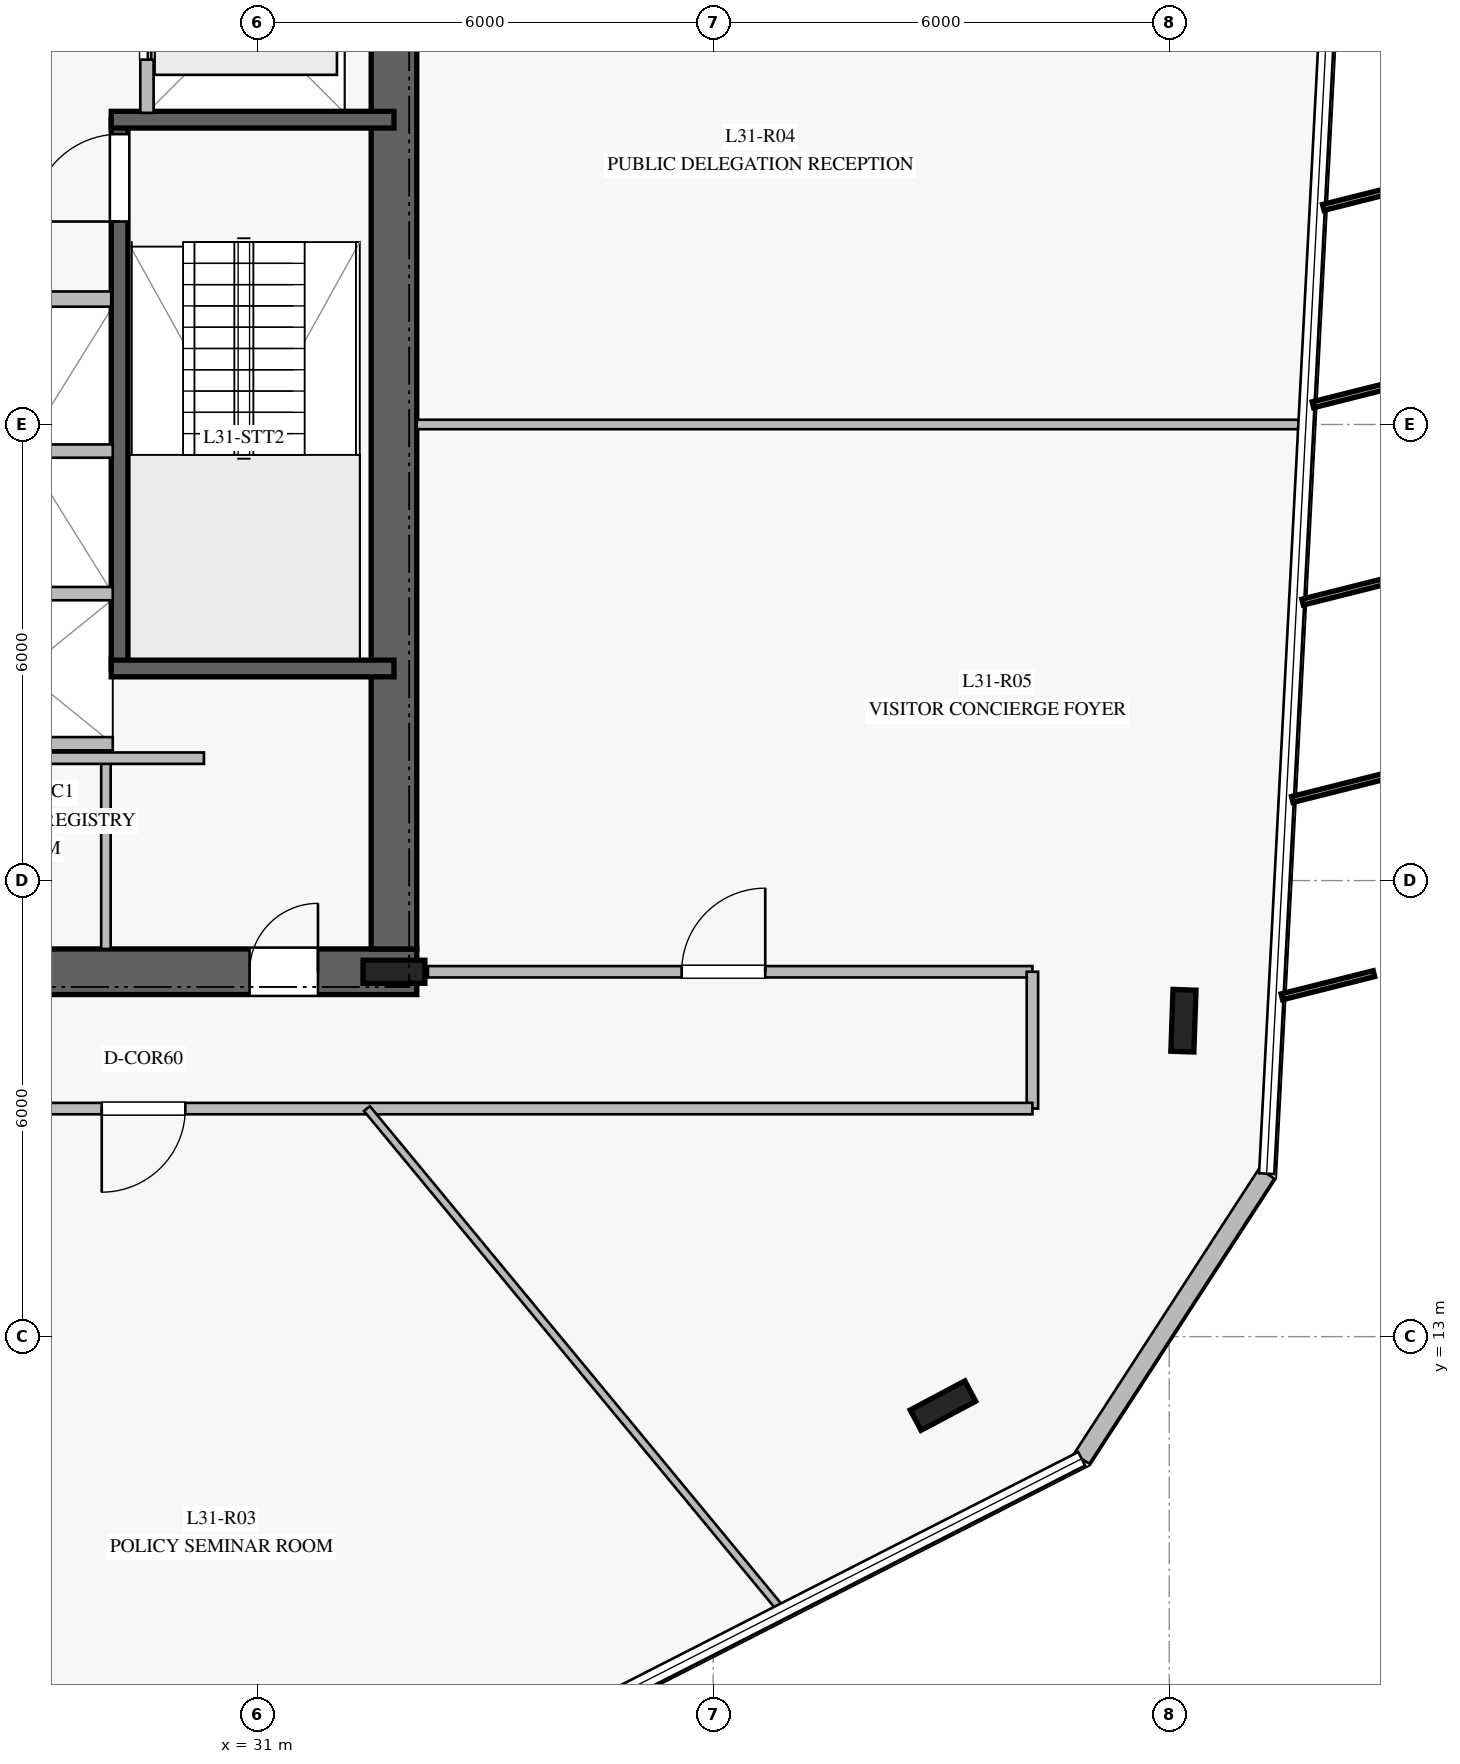
"""IFC4 building model, lengths in metres.
Left out: names, types, materials, properties, quantities, classifications, styles, units other than length and angle.
Written with IfcOpenShell. Run it as: python <this file> out.ifc"""

import sys

from ifc_helpers import new_model, si_unit, direction, frame, frame_2d, origin, origin_2d, place, context, subcontext, project, spatial, rectangle, i_section, extrude, element, fill, save


model = new_model("IFC4")
c1 = context("Model", 3, precision=1e-05, world=origin(), true_north=direction((0.0, 1.0)))
c2 = subcontext(c1, "Body", "Model", "MODEL_VIEW")
j1 = project(units=[si_unit("LENGTHUNIT", "METRE"), si_unit("PLANEANGLEUNIT", "RADIAN")], contexts=[c1])
p1 = place(None, origin())
s1 = spatial("IfcSite", under=j1, at=p1, CompositionType="ELEMENT")
p2 = place(p1, origin())
s2 = spatial("IfcBuilding", under=s1, at=p2, CompositionType="ELEMENT")
p3 = place(p2, frame((0.0, 0.0, 130.4)))
s3 = spatial("IfcBuildingStorey", under=s2, at=p3, CompositionType="ELEMENT", Elevation=130.4)
p4 = place(p3, frame((16.9, 17.8, 0.0), z_axis=(0.0, 0.0, 1.0), x_axis=(1.0, 0.0, 0.0)))
e1 = element("IfcWall", 1, at=p4, inside=s3, PredefinedType="SHEAR", context=c2, shape_type="SweptSolid", body=[
    extrude(rectangle(XDim=16.2, YDim=0.6, at=frame_2d((8.1, 0.0))), origin(), (0.0, 0.0, 1.0), 3.76),
])
p5 = place(p4, frame((5.05, 0.0, 0.0)))
e2 = element("IfcOpeningElement", 2, at=p5, cuts=e1, PredefinedType="OPENING", context=c2, shape_type="SweptSolid", body=[
    extrude(rectangle(XDim=1.2, YDim=2.25, at=frame_2d((0.6, 1.125))), frame((0.0, 0.31, 0.0), z_axis=(0.0, -1.0, 0.0), x_axis=(1.0, 0.0, 0.0)), (0.0, 0.0, 1.0), 0.62),
])
p6 = place(p4, frame((14.0, 0.0, 0.0)))
e3 = element("IfcOpeningElement", 3, at=p6, cuts=e1, PredefinedType="OPENING", context=c2, shape_type="SweptSolid", body=[
    extrude(rectangle(XDim=0.9, YDim=2.1, at=frame_2d((0.45, 1.05))), frame((0.0, 0.31, 0.0), z_axis=(0.0, -1.0, 0.0), x_axis=(1.0, 0.0, 0.0)), (0.0, 0.0, 1.0), 0.62),
])
p7 = place(p4, frame((9.25, 0.0, 0.0)))
e4 = element("IfcOpeningElement", 4, at=p7, cuts=e1, PredefinedType="OPENING", context=c2, shape_type="SweptSolid", body=[
    extrude(rectangle(XDim=1.1, YDim=2.2, at=frame_2d((0.55, 1.1))), frame((0.0, 0.31, 0.0), z_axis=(0.0, -1.0, 0.0), x_axis=(1.0, 0.0, 0.0)), (0.0, 0.0, 1.0), 0.62),
])
p8 = place(p3, frame((32.8, 18.1, 0.0), z_axis=(0.0, 0.0, 1.0), x_axis=(0.0, 1.0, 0.0)))
e5 = element("IfcWall", 5, at=p8, inside=s3, PredefinedType="SHEAR", context=c2, shape_type="SweptSolid", body=[
    extrude(rectangle(XDim=13.8, YDim=0.6, at=frame_2d((6.9, 0.0))), origin(), (0.0, 0.0, 1.0), 3.76),
])
p9 = place(p3, frame((32.8, 17.8, 0.0), z_axis=(0.0, 0.0, 1.0), x_axis=(1.0, 0.0, 0.0)))
e6 = element("IfcColumn", 6, at=p9, inside=s3, PredefinedType="COLUMN", context=c2, shape_type="SweptSolid", body=[
    extrude(i_section(OverallWidth=0.303, OverallDepth=0.814, WebThickness=0.021, FlangeThickness=0.04, at=origin_2d()), origin(), (0.0, 0.0, 1.0), 4.0),
])
p10 = place(p3, frame((29.19, 21.79, 0.0), z_axis=(0.0, 0.0, 1.0), x_axis=(0.0, 1.0, 0.0)))
e7 = element("IfcWall", 7, at=p10, inside=s3, PredefinedType="SOLIDWALL", context=c2, shape_type="SweptSolid", body=[
    extrude(rectangle(XDim=7.22, YDim=0.22, at=frame_2d((3.61, 0.0))), origin(), (0.0, 0.0, 1.0), 3.76),
])
p11 = place(p10, frame((5.88, 0.0, 0.0)))
e8 = element("IfcOpeningElement", 8, at=p11, cuts=e7, PredefinedType="OPENING", context=c2, shape_type="SweptSolid", body=[
    extrude(rectangle(XDim=1.15, YDim=2.2, at=frame_2d((0.575, 1.1))), frame((0.0, 0.12, 0.0), z_axis=(0.0, -1.0, 0.0), x_axis=(1.0, 0.0, 0.0)), (0.0, 0.0, 1.0), 0.24),
])
for number, where, z_axis, x_axis in (
    (9, (29.08, 21.79, 0.0), (0.0, 0.0, 1.0), (1.0, 0.0, 0.0)),
    (10, (29.08, 29.01, 0.0), (0.0, 0.0, 1.0), (1.0, 0.0, 0.0)),
):
    element("IfcWall", number, at=place(p3, frame(where, z_axis=z_axis, x_axis=x_axis)), inside=s3, PredefinedType="SOLIDWALL", context=c2, shape_type="SweptSolid", body=[
        extrude(rectangle(XDim=3.72, YDim=0.22, at=frame_2d((1.86, 0.0))), origin(), (0.0, 0.0, 1.0), 3.76),
    ])
for number, where, z_axis, x_axis in (
    (11, (40.023, 12.092, 0.0), (0.0, 0.0, 1.0), (0.883, 0.469, 0.0)),
    (12, (43.187, 17.156, 0.0), (0.0, 0.0, 1.0), (0.035, 0.999, 0.0)),
):
    element("IfcColumn", number, at=place(p3, frame(where, z_axis=z_axis, x_axis=x_axis)), inside=s3, PredefinedType="COLUMN", context=c2, shape_type="SweptSolid", body=[
        extrude(i_section(OverallWidth=0.303, OverallDepth=0.814, WebThickness=0.021, FlangeThickness=0.04, at=origin_2d()), origin(), (0.0, 0.0, 1.0), 4.0),
    ])
p12 = place(p3, frame((41.848, 11.393, 0.0), z_axis=(0.0, 0.0, 1.0), x_axis=(0.544351046129, 0.838857519832, 0.0)))
e13 = element("IfcWall", 13, at=p12, inside=s3, PredefinedType="STANDARD", context=c2, shape_type="SweptSolid", body=[
    extrude(rectangle(XDim=4.471, YDim=0.24, at=frame_2d((2.236, 0.0))), origin(), (0.0, 0.0, 1.0), 3.76),
])
p13 = place(p3, frame((25.7, 26.65, 0.0), z_axis=(0.0, 0.0, 1.0), x_axis=(1.0, 0.0, 0.0)))
e14 = element("IfcWall", 14, at=p13, inside=s3, PredefinedType="PARTITIONING", context=c2, shape_type="SweptSolid", body=[
    extrude(rectangle(XDim=3.38, YDim=0.2, at=frame_2d((1.69, 0.0))), origin(), (0.0, 0.0, 1.0), 3.76),
])
p14 = place(p3, frame((29.01, 18.1, 0.0), z_axis=(0.0, 0.0, 1.0), x_axis=(0.0, 1.0, 0.0)))
e15 = element("IfcWall", 15, at=p14, inside=s3, PredefinedType="PARTITIONING", context=c2, shape_type="SweptSolid", body=[
    extrude(rectangle(XDim=2.45, YDim=0.125, at=frame_2d((1.225, 0.0))), origin(), (0.0, 0.0, 1.0), 3.76),
])
p15 = place(p3, frame((24.4, 20.61, 0.0), z_axis=(0.0, 0.0, 1.0), x_axis=(1.0, 0.0, 0.0)))
e16 = element("IfcWall", 16, at=p15, inside=s3, PredefinedType="PARTITIONING", context=c2, shape_type="SweptSolid", body=[
    extrude(rectangle(XDim=5.9, YDim=0.15, at=frame_2d((2.95, 0.0))), origin(), (0.0, 0.0, 1.0), 3.76),
])
for number, where, z_axis, x_axis in (
    (17, (26.75, 20.8, 0.0), (0.0, 0.0, 1.0), (1.0, 0.0, 0.0)),
    (18, (26.75, 22.775, 0.0), (0.0, 0.0, 1.0), (1.0, 0.0, 0.0)),
    (19, (26.75, 24.65, 0.0), (0.0, 0.0, 1.0), (1.0, 0.0, 0.0)),
):
    element("IfcWall", number, at=place(p3, frame(where, z_axis=z_axis, x_axis=x_axis)), inside=s3, PredefinedType="PARTITIONING", context=c2, shape_type="SweptSolid", body=[
        extrude(rectangle(XDim=2.35, YDim=0.175, at=frame_2d((1.175, 0.0))), origin(), (0.0, 0.0, 1.0), 3.76),
    ])
p16 = place(p3, frame((29.55, 29.1, 0.0), z_axis=(0.0, 0.0, 1.0), x_axis=(0.0, 1.0, 0.0)))
e20 = element("IfcWall", 20, at=p16, inside=s3, PredefinedType="PARTITIONING", context=c2, shape_type="SweptSolid", body=[
    extrude(rectangle(XDim=2.6, YDim=0.175, at=frame_2d((1.3, 0.0))), origin(), (0.0, 0.0, 1.0), 3.76),
])
p17 = place(p16, frame((0.7, 0.0, 0.0)))
e21 = element("IfcOpeningElement", 21, at=p17, cuts=e20, PredefinedType="OPENING", context=c2, shape_type="SweptSolid", body=[
    extrude(rectangle(XDim=1.2, YDim=2.2, at=frame_2d((0.6, 1.1))), frame((0.0, 0.098, 0.0), z_axis=(0.0, -1.0, 0.0), x_axis=(1.0, 0.0, 0.0)), (0.0, 0.0, 1.0), 0.195),
])
p18 = place(p3, frame((33.247, 17.8, 0.0), z_axis=(0.0, 0.0, 1.0), x_axis=(1.0, 0.0, 0.0)))
e22 = element("IfcWall", 22, at=p18, inside=s3, PredefinedType="PARTITIONING", context=c2, shape_type="SweptSolid", body=[
    extrude(rectangle(XDim=7.953, YDim=0.15, at=frame_2d((3.977, 0.0))), origin(), (0.0, 0.0, 1.0), 3.21),
])
p19 = place(p18, frame((3.338, 0.0, 0.0)))
e23 = element("IfcOpeningElement", 23, at=p19, cuts=e22, PredefinedType="OPENING", context=c2, shape_type="SweptSolid", body=[
    extrude(rectangle(XDim=1.1, YDim=2.2, at=frame_2d((0.55, 1.1))), frame((0.0, 0.085, 0.0), z_axis=(0.0, -1.0, 0.0), x_axis=(1.0, 0.0, 0.0)), (0.0, 0.0, 1.0), 0.17),
])
p20 = place(p3, frame((41.2, 17.8, 0.0), z_axis=(0.0, 0.0, 1.0), x_axis=(0.0, -1.0, 0.0)))
e24 = element("IfcWall", 24, at=p20, inside=s3, PredefinedType="PARTITIONING", context=c2, shape_type="SweptSolid", body=[
    extrude(rectangle(XDim=1.8, YDim=0.15, at=frame_2d((0.9, 0.0))), origin(), (0.0, 0.0, 1.0), 3.21),
])
p21 = place(p3, frame((41.2, 16.0, 0.0), z_axis=(0.0, 0.0, 1.0), x_axis=(-1.0, 0.0, 0.0)))
e25 = element("IfcWall", 25, at=p21, inside=s3, PredefinedType="PARTITIONING", context=c2, shape_type="SweptSolid", body=[
    extrude(rectangle(XDim=15.25, YDim=0.15, at=frame_2d((7.625, 0.0))), origin(), (0.0, 0.0, 1.0), 3.21),
])
p22 = place(p21, frame((11.145, 0.0, 0.0)))
e26 = element("IfcOpeningElement", 26, at=p22, cuts=e25, PredefinedType="OPENING", context=c2, shape_type="SweptSolid", body=[
    extrude(rectangle(XDim=1.1, YDim=2.2, at=frame_2d((0.55, 1.1))), frame((0.0, 0.085, 0.0), z_axis=(0.0, -1.0, 0.0), x_axis=(1.0, 0.0, 0.0)), (0.0, 0.0, 1.0), 0.17),
])
p23 = place(p3, frame((32.444, 16.0, 0.0), z_axis=(0.0, 0.0, 1.0), x_axis=(0.637251985901, -0.770655504402, 0.0)))
e27 = element("IfcWall", 27, at=p23, inside=s3, PredefinedType="MOVABLE", context=c2, shape_type="SweptSolid", body=[
    extrude(rectangle(XDim=8.563, YDim=0.1, at=frame_2d((4.281, 0.0))), origin(), (0.0, 0.0, 1.0), 3.16),
])
p24 = place(p3, frame((33.1, 25.0, 0.0), z_axis=(0.0, 0.0, 1.0), x_axis=(1.0, 0.0, 0.0)))
e28 = element("IfcWall", 28, at=p24, inside=s3, PredefinedType="PARTITIONING", context=c2, shape_type="SweptSolid", body=[
    extrude(rectangle(XDim=11.682, YDim=0.125, at=frame_2d((5.841, 0.0))), origin(), (0.0, 0.0, 1.0), 3.16),
])
p25 = place(p11, origin())
e29 = element("IfcDoor", 29, at=p25, inside=s3, OperationType="SINGLE_SWING_LEFT", PredefinedType="DOOR", context=c2, shape_type="SweptSolid", body=[
    extrude(rectangle(XDim=1.15, YDim=2.2, at=frame_2d((0.575, 1.1))), frame((0.0, 0.025, 0.0), z_axis=(0.0, -1.0, 0.0), x_axis=(1.0, 0.0, 0.0)), (0.0, 0.0, 1.0), 0.05),
])
fill(e8, e29)
p26 = place(p6, origin())
e30 = element("IfcDoor", 30, at=p26, inside=s3, OperationType="SINGLE_SWING_RIGHT", PredefinedType="DOOR", context=c2, shape_type="SweptSolid", body=[
    extrude(rectangle(XDim=0.9, YDim=2.1, at=frame_2d((0.45, 1.05))), frame((0.0, 0.025, 0.0), z_axis=(0.0, -1.0, 0.0), x_axis=(1.0, 0.0, 0.0)), (0.0, 0.0, 1.0), 0.05),
])
fill(e3, e30)
p27 = place(p17, origin())
e31 = element("IfcDoor", 31, at=p27, inside=s3, OperationType="DOUBLE_DOOR_SLIDING", PredefinedType="DOOR", context=c2, shape_type="SweptSolid", body=[
    extrude(rectangle(XDim=1.2, YDim=2.2, at=frame_2d((0.6, 1.1))), frame((0.0, 0.025, 0.0), z_axis=(0.0, -1.0, 0.0), x_axis=(1.0, 0.0, 0.0)), (0.0, 0.0, 1.0), 0.05),
])
fill(e21, e31)
p28 = place(p22, origin())
e32 = element("IfcDoor", 32, at=p28, inside=s3, OperationType="SINGLE_SWING_RIGHT", PredefinedType="DOOR", context=c2, shape_type="SweptSolid", body=[
    extrude(rectangle(XDim=1.1, YDim=2.2, at=frame_2d((0.55, 1.1))), frame((0.0, 0.025, 0.0), z_axis=(0.0, -1.0, 0.0), x_axis=(1.0, 0.0, 0.0)), (0.0, 0.0, 1.0), 0.05),
])
fill(e26, e32)
p29 = place(p19, origin())
e33 = element("IfcDoor", 33, at=p29, inside=s3, OperationType="SINGLE_SWING_RIGHT", PredefinedType="DOOR", context=c2, shape_type="SweptSolid", body=[
    extrude(rectangle(XDim=1.1, YDim=2.2, at=frame_2d((0.55, 1.1))), frame((0.0, 0.025, 0.0), z_axis=(0.0, -1.0, 0.0), x_axis=(1.0, 0.0, 0.0)), (0.0, 0.0, 1.0), 0.05),
])
fill(e23, e33)
save(model, sys.argv[1])
